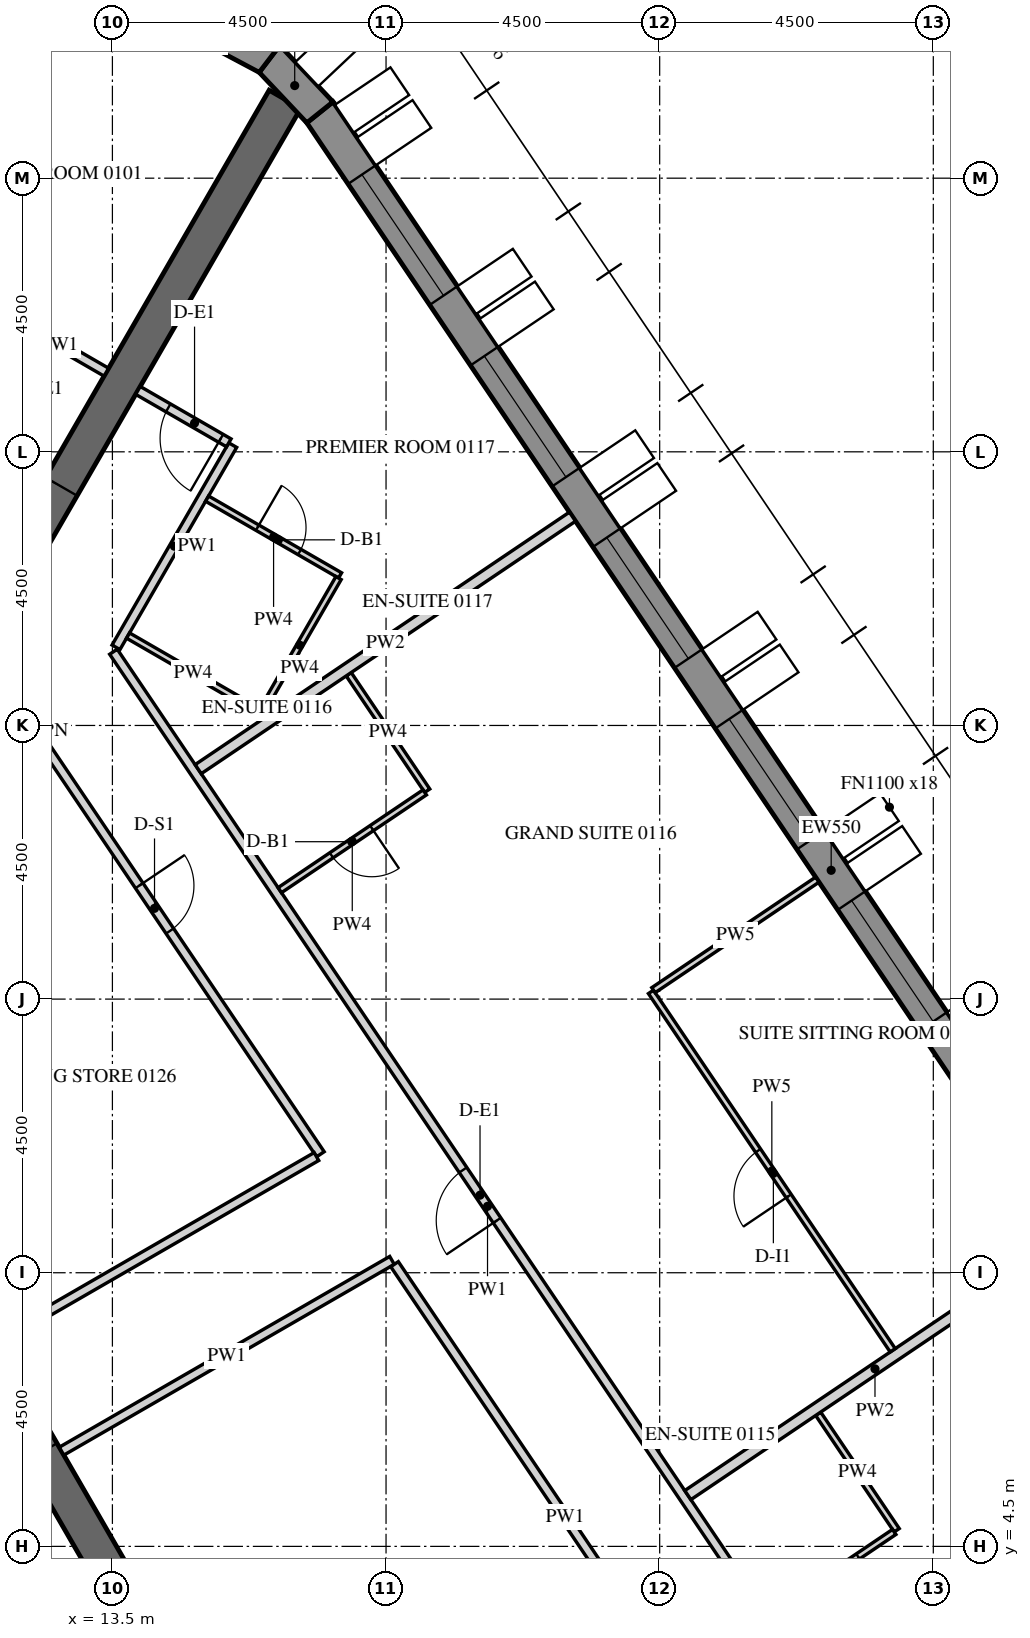
"""IFC4 building model, lengths in metres.
Left out: names, types, materials, properties, quantities, classifications, styles, units other than length and angle.
Written with IfcOpenShell. Run it as: python <this file> out.ifc"""

import sys

from ifc_helpers import new_model, si_unit, direction, frame, frame_2d, origin, place, context, subcontext, project, spatial, polyline, rectangle, outline, extrude, element, fill, save


model = new_model("IFC4")
c1 = context("Model", 3, precision=1e-05, world=origin(), true_north=direction((0.0, 1.0)))
c2 = subcontext(c1, "Body", "Model", "MODEL_VIEW")
j1 = project(units=[si_unit("LENGTHUNIT", "METRE"), si_unit("PLANEANGLEUNIT", "RADIAN")], contexts=[c1])
p1 = place(None, origin())
s1 = spatial("IfcSite", under=j1, at=p1, CompositionType="ELEMENT")
p2 = place(p1, origin())
s2 = spatial("IfcBuilding", under=s1, at=p2, CompositionType="ELEMENT")
p3 = place(p2, frame((0.0, 0.0, 37.5)))
s3 = spatial("IfcBuildingStorey", under=s2, at=p3, CompositionType="ELEMENT", Elevation=37.5)
p4 = place(p3, frame((33.728, 3.153, -0.15), z_axis=(0.0, 0.0, 1.0), x_axis=(-0.559192411416, 0.82903790445, 0.0)))
e1 = element("IfcWall", 1, at=p4, inside=s3, PredefinedType="SOLIDWALL", context=c2, shape_type="SweptSolid", body=[
    extrude(outline(polyline([(-0.026, -0.275), (30.093, -0.275), (30.048, 0.275), (0.026, 0.275), (-0.026, -0.275)])), origin(), (0.0, 0.0, 1.0), 3.9),
])
p5 = place(p4, frame((1.236, 0.0, 1.05)))
e2 = element("IfcOpeningElement", 2, at=p5, cuts=e1, PredefinedType="OPENING", context=c2, shape_type="SweptSolid", body=[
    extrude(rectangle(XDim=2.4, YDim=2.4, at=frame_2d((1.2, 1.2))), frame((0.0, 0.285, 0.0), z_axis=(0.0, -1.0, 0.0), x_axis=(1.0, 0.0, 0.0)), (0.0, 0.0, 1.0), 0.57),
])
p6 = place(p4, frame((4.835, 0.0, 1.05)))
e3 = element("IfcOpeningElement", 3, at=p6, cuts=e1, PredefinedType="OPENING", context=c2, shape_type="SweptSolid", body=[
    extrude(rectangle(XDim=2.4, YDim=2.4, at=frame_2d((1.2, 1.2))), frame((0.0, 0.285, 0.0), z_axis=(0.0, -1.0, 0.0), x_axis=(1.0, 0.0, 0.0)), (0.0, 0.0, 1.0), 0.57),
])
p7 = place(p4, frame((8.436, 0.0, 1.05)))
e4 = element("IfcOpeningElement", 4, at=p7, cuts=e1, PredefinedType="OPENING", context=c2, shape_type="SweptSolid", body=[
    extrude(rectangle(XDim=2.4, YDim=2.4, at=frame_2d((1.2, 1.2))), frame((0.0, 0.285, 0.0), z_axis=(0.0, -1.0, 0.0), x_axis=(1.0, 0.0, 0.0)), (0.0, 0.0, 1.0), 0.57),
])
p8 = place(p4, frame((12.035, 0.0, 1.05)))
e5 = element("IfcOpeningElement", 5, at=p8, cuts=e1, PredefinedType="OPENING", context=c2, shape_type="SweptSolid", body=[
    extrude(rectangle(XDim=2.4, YDim=2.4, at=frame_2d((1.2, 1.2))), frame((0.0, 0.285, 0.0), z_axis=(0.0, -1.0, 0.0), x_axis=(1.0, 0.0, 0.0)), (0.0, 0.0, 1.0), 0.57),
])
p9 = place(p4, frame((15.635, 0.0, 1.05)))
e6 = element("IfcOpeningElement", 6, at=p9, cuts=e1, PredefinedType="OPENING", context=c2, shape_type="SweptSolid", body=[
    extrude(rectangle(XDim=2.4, YDim=2.4, at=frame_2d((1.2, 1.2))), frame((0.0, 0.285, 0.0), z_axis=(0.0, -1.0, 0.0), x_axis=(1.0, 0.0, 0.0)), (0.0, 0.0, 1.0), 0.57),
])
p10 = place(p4, frame((19.236, 0.0, 1.05)))
e7 = element("IfcOpeningElement", 7, at=p10, cuts=e1, PredefinedType="OPENING", context=c2, shape_type="SweptSolid", body=[
    extrude(rectangle(XDim=2.4, YDim=2.4, at=frame_2d((1.2, 1.2))), frame((0.0, 0.285, 0.0), z_axis=(0.0, -1.0, 0.0), x_axis=(1.0, 0.0, 0.0)), (0.0, 0.0, 1.0), 0.57),
])
p11 = place(p4, frame((22.835, 0.0, 1.05)))
e8 = element("IfcOpeningElement", 8, at=p11, cuts=e1, PredefinedType="OPENING", context=c2, shape_type="SweptSolid", body=[
    extrude(rectangle(XDim=2.4, YDim=2.4, at=frame_2d((1.2, 1.2))), frame((0.0, 0.285, 0.0), z_axis=(0.0, -1.0, 0.0), x_axis=(1.0, 0.0, 0.0)), (0.0, 0.0, 1.0), 0.57),
])
p12 = place(p4, frame((26.436, 0.0, 1.05)))
e9 = element("IfcOpeningElement", 9, at=p12, cuts=e1, PredefinedType="OPENING", context=c2, shape_type="SweptSolid", body=[
    extrude(rectangle(XDim=2.4, YDim=2.4, at=frame_2d((1.2, 1.2))), frame((0.0, 0.285, 0.0), z_axis=(0.0, -1.0, 0.0), x_axis=(1.0, 0.0, 0.0)), (0.0, 0.0, 1.0), 0.57),
])
p13 = place(p3, frame((16.913, 28.083, -0.15), z_axis=(0.0, 0.0, 1.0), x_axis=(-0.686196220404, 0.727416488061, 0.0)))
e10 = element("IfcWall", 10, at=p13, inside=s3, PredefinedType="SOLIDWALL", context=c2, shape_type="SweptSolid", body=[
    extrude(outline(polyline([(-0.022, -0.275), (1.253, -0.275), (1.163, 0.275), (0.022, 0.275), (-0.022, -0.275)])), origin(), (0.0, 0.0, 1.0), 3.9),
])
p14 = place(p3, frame((16.083, 28.962, -0.15), z_axis=(0.0, 0.0, 1.0), x_axis=(-0.882995347911, 0.469381737574, 0.0)))
e11 = element("IfcWall", 11, at=p14, inside=s3, PredefinedType="SOLIDWALL", context=c2, shape_type="SweptSolid", body=[
    extrude(outline(polyline([(-0.045, -0.275), (1.253, -0.275), (1.163, 0.275), (0.045, 0.275), (-0.045, -0.275)])), origin(), (0.0, 0.0, 1.0), 3.9),
])
p15 = place(p3, frame((15.819, 0.0, -0.15), z_axis=(0.0, 0.0, 1.0), x_axis=(-0.499999880136, 0.866025472988, 0.0)))
e12 = element("IfcWall", 12, at=p15, inside=s3, PredefinedType="SHEAR", context=c2, shape_type="SweptSolid", body=[
    extrude(outline(polyline([(-0.173, -0.3), (15.993, -0.3), (15.646, 0.3), (0.173, 0.3), (-0.173, -0.3)])), origin(), (0.0, 0.0, 1.0), 3.9),
])
p16 = place(p15, frame((6.981, 0.0, 0.15)))
e13 = element("IfcOpeningElement", 13, at=p16, cuts=e12, PredefinedType="OPENING", context=c2, shape_type="SweptSolid", body=[
    extrude(rectangle(XDim=1.8, YDim=2.4, at=frame_2d((0.9, 1.2))), frame((0.0, 0.31, 0.0), z_axis=(0.0, -1.0, 0.0), x_axis=(1.0, 0.0, 0.0)), (0.0, 0.0, 1.0), 0.62),
])
p17 = place(p3, frame((8.083, 14.0, -0.15), z_axis=(0.0, 0.0, 1.0), x_axis=(0.499997680643, 0.866026742862, 0.0)))
e14 = element("IfcWall", 14, at=p17, inside=s3, PredefinedType="SHEAR", context=c2, shape_type="SweptSolid", body=[
    extrude(rectangle(XDim=16.509, YDim=0.6, at=frame_2d((8.254, 0.0))), origin(), (0.0, 0.0, 1.0), 3.9),
])
p18 = place(p17, frame((7.354, 0.0, 0.15)))
e15 = element("IfcOpeningElement", 15, at=p18, cuts=e14, PredefinedType="OPENING", context=c2, shape_type="SweptSolid", body=[
    extrude(rectangle(XDim=1.8, YDim=2.4, at=frame_2d((0.9, 1.2))), frame((0.0, 0.31, 0.0), z_axis=(0.0, -1.0, 0.0), x_axis=(1.0, 0.0, 0.0)), (0.0, 0.0, 1.0), 0.62),
])
p19 = place(p3, frame((13.4, 23.81, 0.0), z_axis=(0.0, 0.0, 1.0), x_axis=(-0.865989075817, 0.500062916607, 0.0)))
e16 = element("IfcWall", 16, at=p19, inside=s3, PredefinedType="PARTITIONING", context=c2, shape_type="SweptSolid", body=[
    extrude(rectangle(XDim=1.8, YDim=0.15, at=frame_2d((0.9, 0.0))), origin(), (0.0, 0.0, 1.0), 2.988),
])
p20 = place(p3, frame((25.821, 0.972, 0.0), z_axis=(0.0, 0.0, 1.0), x_axis=(-0.559193816298, 0.829036956845, 0.0)))
e17 = element("IfcWall", 17, at=p20, inside=s3, PredefinedType="PARTITIONING", context=c2, shape_type="SweptSolid", body=[
    extrude(rectangle(XDim=22.002, YDim=0.15, at=frame_2d((11.001, 0.0))), origin(), (0.0, 0.0, 1.0), 2.988),
])
p21 = place(p20, frame((0.869, 0.0, 0.0)))
e18 = element("IfcOpeningElement", 18, at=p21, cuts=e17, PredefinedType="OPENING", context=c2, shape_type="SweptSolid", body=[
    extrude(rectangle(XDim=1.0, YDim=2.1, at=frame_2d((0.5, 1.05))), frame((0.0, 0.085, 0.0), z_axis=(0.0, -1.0, 0.0), x_axis=(1.0, 0.0, 0.0)), (0.0, 0.0, 1.0), 0.17),
])
p22 = place(p20, frame((10.721, 0.0, 0.0)))
e19 = element("IfcOpeningElement", 19, at=p22, cuts=e17, PredefinedType="OPENING", context=c2, shape_type="SweptSolid", body=[
    extrude(rectangle(XDim=1.0, YDim=2.1, at=frame_2d((0.5, 1.05))), frame((0.0, 0.085, 0.0), z_axis=(0.0, -1.0, 0.0), x_axis=(1.0, 0.0, 0.0)), (0.0, 0.0, 1.0), 0.17),
])
p23 = place(p3, frame((13.559, 19.285, 0.0), z_axis=(0.0, 0.0, 1.0), x_axis=(0.499975646431, 0.866039463868, 0.0)))
e20 = element("IfcWall", 20, at=p23, inside=s3, PredefinedType="PARTITIONING", context=c2, shape_type="SweptSolid", body=[
    extrude(rectangle(XDim=3.84, YDim=0.15, at=frame_2d((1.92, 0.0))), origin(), (0.0, 0.0, 1.0), 2.988),
])
p24 = place(p3, frame((15.414, 22.648, 0.0), z_axis=(0.0, 0.0, 1.0), x_axis=(-0.866074815912, 0.499914405916, 0.0)))
e21 = element("IfcWall", 21, at=p24, inside=s3, PredefinedType="PARTITIONING", context=c2, shape_type="SweptSolid", body=[
    extrude(rectangle(XDim=1.725, YDim=0.15, at=frame_2d((0.862, 0.0))), origin(), (0.0, 0.0, 1.0), 2.988),
])
p25 = place(p24, frame((0.15, 0.0, 0.0)))
e22 = element("IfcOpeningElement", 22, at=p25, cuts=e21, PredefinedType="OPENING", context=c2, shape_type="SweptSolid", body=[
    extrude(rectangle(XDim=1.0, YDim=2.1, at=frame_2d((0.5, 1.05))), frame((0.0, 0.085, 0.0), z_axis=(0.0, -1.0, 0.0), x_axis=(1.0, 0.0, 0.0)), (0.0, 0.0, 1.0), 0.17),
])
p26 = place(p3, frame((12.664, 6.066, 0.0), z_axis=(0.0, 0.0, 1.0), x_axis=(0.866036561919, 0.499980673046, 0.0)))
e23 = element("IfcWall", 23, at=p26, inside=s3, PredefinedType="PARTITIONING", context=c2, shape_type="SweptSolid", body=[
    extrude(rectangle(XDim=6.275, YDim=0.15, at=frame_2d((3.137, 0.0))), origin(), (0.0, 0.0, 1.0), 2.988),
])
p27 = place(p3, frame((18.14, 9.141, 0.0), z_axis=(0.0, 0.0, 1.0), x_axis=(0.55918799196, -0.829040885389, 0.0)))
e24 = element("IfcWall", 24, at=p27, inside=s3, PredefinedType="PARTITIONING", context=c2, shape_type="SweptSolid", body=[
    extrude(rectangle(XDim=10.025, YDim=0.15, at=frame_2d((5.013, 0.0))), origin(), (0.0, 0.0, 1.0), 2.988),
])
p28 = place(p3, frame((11.465, 19.037, 0.0), z_axis=(0.0, 0.0, 1.0), x_axis=(0.559196064773, -0.829035440221, 0.0)))
e25 = element("IfcWall", 25, at=p28, inside=s3, PredefinedType="PARTITIONING", context=c2, shape_type="SweptSolid", body=[
    extrude(rectangle(XDim=9.757, YDim=0.15, at=frame_2d((4.878, 0.0))), origin(), (0.0, 0.0, 1.0), 2.988),
])
p29 = place(p28, frame((4.428, 0.0, 0.0)))
e26 = element("IfcOpeningElement", 26, at=p29, cuts=e25, PredefinedType="OPENING", context=c2, shape_type="SweptSolid", body=[
    extrude(rectangle(XDim=0.9, YDim=2.1, at=frame_2d((0.45, 1.05))), frame((0.0, 0.085, 0.0), z_axis=(0.0, -1.0, 0.0), x_axis=(1.0, 0.0, 0.0)), (0.0, 0.0, 1.0), 0.17),
])
p30 = place(p3, frame((16.855, 10.911, 0.0), z_axis=(0.0, 0.0, 1.0), x_axis=(-0.866020343444, -0.500008764664, 0.0)))
e27 = element("IfcWall", 27, at=p30, inside=s3, PredefinedType="PARTITIONING", context=c2, shape_type="SweptSolid", body=[
    extrude(rectangle(XDim=6.053, YDim=0.15, at=frame_2d((3.026, 0.0))), origin(), (0.0, 0.0, 1.0), 2.988),
])
p31 = place(p3, frame((25.107, 6.68, 0.0), z_axis=(0.0, 0.0, 1.0), x_axis=(0.559204176839, -0.829029968461, 0.0)))
e28 = element("IfcWall", 28, at=p31, inside=s3, PredefinedType="PARTITIONING", context=c2, shape_type="SweptSolid", body=[
    extrude(rectangle(XDim=2.31, YDim=0.1, at=frame_2d((1.155, 0.0))), origin(), (0.0, 0.0, 1.0), 2.988),
])
p32 = place(p3, frame((26.357, 4.737, 0.0), z_axis=(0.0, 0.0, 1.0), x_axis=(-0.829094460354, -0.559108554585, 0.0)))
e29 = element("IfcWall", 29, at=p32, inside=s3, PredefinedType="PARTITIONING", context=c2, shape_type="SweptSolid", body=[
    extrude(rectangle(XDim=2.475, YDim=0.1, at=frame_2d((1.238, 0.0))), origin(), (0.0, 0.0, 1.0), 2.988),
])
p33 = place(p32, frame((0.72, 0.0, 0.0)))
e30 = element("IfcOpeningElement", 30, at=p33, cuts=e29, PredefinedType="OPENING", context=c2, shape_type="SweptSolid", body=[
    extrude(rectangle(XDim=0.8, YDim=2.1, at=frame_2d((0.4, 1.05))), frame((0.0, 0.06, 0.0), z_axis=(0.0, -1.0, 0.0), x_axis=(1.0, 0.0, 0.0)), (0.0, 0.0, 1.0), 0.12),
])
p34 = place(p3, frame((29.119, 9.495, 0.0), z_axis=(0.0, 0.0, 1.0), x_axis=(-0.829038452737, -0.559191598545, 0.0)))
e31 = element("IfcWall", 31, at=p34, inside=s3, PredefinedType="PARTITIONING", context=c2, shape_type="SweptSolid", body=[
    extrude(rectangle(XDim=7.425, YDim=0.18, at=frame_2d((3.713, 0.0))), origin(), (0.0, 0.0, 1.0), 2.988),
])
p35 = place(p3, frame((17.386, 18.842, 0.0), z_axis=(0.0, 0.0, 1.0), x_axis=(0.559131530856, -0.829078965602, 0.0)))
e32 = element("IfcWall", 32, at=p35, inside=s3, PredefinedType="PARTITIONING", context=c2, shape_type="SweptSolid", body=[
    extrude(rectangle(XDim=2.31, YDim=0.1, at=frame_2d((1.155, 0.0))), origin(), (0.0, 0.0, 1.0), 2.988),
])
p36 = place(p3, frame((18.636, 16.899, 0.0), z_axis=(0.0, 0.0, 1.0), x_axis=(-0.82904649496, -0.559179675234, 0.0)))
e33 = element("IfcWall", 33, at=p36, inside=s3, PredefinedType="PARTITIONING", context=c2, shape_type="SweptSolid", body=[
    extrude(rectangle(XDim=2.875, YDim=0.1, at=frame_2d((1.438, 0.0))), origin(), (0.0, 0.0, 1.0), 2.988),
])
p37 = place(p36, frame((1.05, 0.0, 0.0)))
e34 = element("IfcOpeningElement", 34, at=p37, cuts=e33, PredefinedType="OPENING", context=c2, shape_type="SweptSolid", body=[
    extrude(rectangle(XDim=0.8, YDim=2.1, at=frame_2d((0.4, 1.05))), frame((0.0, 0.06, 0.0), z_axis=(0.0, -1.0, 0.0), x_axis=(1.0, 0.0, 0.0)), (0.0, 0.0, 1.0), 0.12),
])
p38 = place(p3, frame((26.333, 7.724, 0.0), z_axis=(0.0, 0.0, 1.0), x_axis=(-0.559185029686, 0.829042883435, 0.0)))
e35 = element("IfcWall", 35, at=p38, inside=s3, PredefinedType="PARTITIONING", context=c2, shape_type="SweptSolid", body=[
    extrude(rectangle(XDim=7.11, YDim=0.1, at=frame_2d((3.555, 0.0))), origin(), (0.0, 0.0, 1.0), 2.988),
])
p39 = place(p38, frame((3.06, 0.0, 0.0)))
e36 = element("IfcOpeningElement", 36, at=p39, cuts=e35, PredefinedType="OPENING", context=c2, shape_type="SweptSolid", body=[
    extrude(rectangle(XDim=0.9, YDim=2.1, at=frame_2d((0.45, 1.05))), frame((0.0, 0.06, 0.0), z_axis=(0.0, -1.0, 0.0), x_axis=(1.0, 0.0, 0.0)), (0.0, 0.0, 1.0), 0.12),
])
p40 = place(p3, frame((22.398, 13.647, 0.0), z_axis=(0.0, 0.0, 1.0), x_axis=(0.829033253898, 0.55919930609, 0.0)))
e37 = element("IfcWall", 37, at=p40, inside=s3, PredefinedType="PARTITIONING", context=c2, shape_type="SweptSolid", body=[
    extrude(rectangle(XDim=3.25, YDim=0.1, at=frame_2d((1.625, 0.0))), origin(), (0.0, 0.0, 1.0), 2.988),
])
p41 = place(p3, frame((21.066, 21.433, 0.0), z_axis=(0.0, 0.0, 1.0), x_axis=(-0.829028170871, -0.559206841788, 0.0)))
e38 = element("IfcWall", 38, at=p41, inside=s3, PredefinedType="PARTITIONING", context=c2, shape_type="SweptSolid", body=[
    extrude(rectangle(XDim=7.425, YDim=0.18, at=frame_2d((3.712, 0.0))), origin(), (0.0, 0.0, 1.0), 2.988),
])
p42 = place(p3, frame((15.057, 21.73, 0.0), z_axis=(0.0, 0.0, 1.0), x_axis=(0.866014894461, -0.50001820224, 0.0)))
e39 = element("IfcWall", 39, at=p42, inside=s3, PredefinedType="PARTITIONING", context=c2, shape_type="SweptSolid", body=[
    extrude(rectangle(XDim=2.525, YDim=0.1, at=frame_2d((1.262, 0.0))), origin(), (0.0, 0.0, 1.0), 2.988),
])
p43 = place(p42, frame((0.955, 0.0, 0.0)))
e40 = element("IfcOpeningElement", 40, at=p43, cuts=e39, PredefinedType="OPENING", context=c2, shape_type="SweptSolid", body=[
    extrude(rectangle(XDim=0.8, YDim=2.1, at=frame_2d((0.4, 1.05))), frame((0.0, 0.06, 0.0), z_axis=(0.0, -1.0, 0.0), x_axis=(1.0, 0.0, 0.0)), (0.0, 0.0, 1.0), 0.12),
])
p44 = place(p3, frame((17.219, 20.424, 0.0), z_axis=(0.0, 0.0, 1.0), x_axis=(-0.499948979701, -0.866054858364, 0.0)))
e41 = element("IfcWall", 41, at=p44, inside=s3, PredefinedType="PARTITIONING", context=c2, shape_type="SweptSolid", body=[
    extrude(rectangle(XDim=2.55, YDim=0.1, at=frame_2d((1.275, 0.0))), origin(), (0.0, 0.0, 1.0), 2.988),
])
p45 = place(p3, frame((15.901, 18.241, 0.0), z_axis=(0.0, 0.0, 1.0), x_axis=(-0.866006523861, 0.500032699561, 0.0)))
e42 = element("IfcWall", 42, at=p45, inside=s3, PredefinedType="PARTITIONING", context=c2, shape_type="SweptSolid", body=[
    extrude(rectangle(XDim=2.475, YDim=0.1, at=frame_2d((1.237, 0.0))), origin(), (0.0, 0.0, 1.0), 2.988),
])
p46 = place(p8, frame((0.0, 0.205, 0.0)))
e43 = element("IfcWindow", 43, at=p46, inside=s3, PartitioningType="DOUBLE_PANEL_VERTICAL", PredefinedType="WINDOW", context=c2, shape_type="SweptSolid", body=[
    extrude(rectangle(XDim=2.4, YDim=2.4, at=frame_2d((1.2, 1.2))), frame((0.0, 0.03, 0.0), z_axis=(0.0, -1.0, 0.0), x_axis=(1.0, 0.0, 0.0)), (0.0, 0.0, 1.0), 0.06),
])
fill(e5, e43)
p47 = place(p9, frame((0.0, 0.205, 0.0)))
e44 = element("IfcWindow", 44, at=p47, inside=s3, PartitioningType="DOUBLE_PANEL_VERTICAL", PredefinedType="WINDOW", context=c2, shape_type="SweptSolid", body=[
    extrude(rectangle(XDim=2.4, YDim=2.4, at=frame_2d((1.2, 1.2))), frame((0.0, 0.03, 0.0), z_axis=(0.0, -1.0, 0.0), x_axis=(1.0, 0.0, 0.0)), (0.0, 0.0, 1.0), 0.06),
])
fill(e6, e44)
p48 = place(p10, frame((0.0, 0.205, 0.0)))
e45 = element("IfcWindow", 45, at=p48, inside=s3, PartitioningType="DOUBLE_PANEL_VERTICAL", PredefinedType="WINDOW", context=c2, shape_type="SweptSolid", body=[
    extrude(rectangle(XDim=2.4, YDim=2.4, at=frame_2d((1.2, 1.2))), frame((0.0, 0.03, 0.0), z_axis=(0.0, -1.0, 0.0), x_axis=(1.0, 0.0, 0.0)), (0.0, 0.0, 1.0), 0.06),
])
fill(e7, e45)
p49 = place(p11, frame((0.0, 0.205, 0.0)))
e46 = element("IfcWindow", 46, at=p49, inside=s3, PartitioningType="DOUBLE_PANEL_VERTICAL", PredefinedType="WINDOW", context=c2, shape_type="SweptSolid", body=[
    extrude(rectangle(XDim=2.4, YDim=2.4, at=frame_2d((1.2, 1.2))), frame((0.0, 0.03, 0.0), z_axis=(0.0, -1.0, 0.0), x_axis=(1.0, 0.0, 0.0)), (0.0, 0.0, 1.0), 0.06),
])
fill(e8, e46)
p50 = place(p12, frame((0.0, 0.205, 0.0)))
e47 = element("IfcWindow", 47, at=p50, inside=s3, PartitioningType="DOUBLE_PANEL_VERTICAL", PredefinedType="WINDOW", context=c2, shape_type="SweptSolid", body=[
    extrude(rectangle(XDim=2.4, YDim=2.4, at=frame_2d((1.2, 1.2))), frame((0.0, 0.03, 0.0), z_axis=(0.0, -1.0, 0.0), x_axis=(1.0, 0.0, 0.0)), (0.0, 0.0, 1.0), 0.06),
])
fill(e9, e47)
p51 = place(p18, origin())
e48 = element("IfcDoor", 48, at=p51, inside=s3, OperationType="DOUBLE_DOOR_SINGLE_SWING", PredefinedType="DOOR", context=c2, shape_type="SweptSolid", body=[
    extrude(rectangle(XDim=1.8, YDim=2.4, at=frame_2d((0.9, 1.2))), frame((0.0, 0.025, 0.0), z_axis=(0.0, -1.0, 0.0), x_axis=(1.0, 0.0, 0.0)), (0.0, 0.0, 1.0), 0.05),
])
fill(e15, e48)
p52 = place(p33, origin())
e49 = element("IfcDoor", 49, at=p52, inside=s3, OperationType="SINGLE_SWING_RIGHT", PredefinedType="DOOR", context=c2, shape_type="SweptSolid", body=[
    extrude(rectangle(XDim=0.8, YDim=2.1, at=frame_2d((0.4, 1.05))), frame((0.0, 0.025, 0.0), z_axis=(0.0, -1.0, 0.0), x_axis=(1.0, 0.0, 0.0)), (0.0, 0.0, 1.0), 0.05),
])
fill(e30, e49)
p53 = place(p22, origin())
e50 = element("IfcDoor", 50, at=p53, inside=s3, OperationType="SINGLE_SWING_RIGHT", PredefinedType="DOOR", context=c2, shape_type="SweptSolid", body=[
    extrude(rectangle(XDim=1.0, YDim=2.1, at=frame_2d((0.5, 1.05))), frame((0.0, 0.025, 0.0), z_axis=(0.0, -1.0, 0.0), x_axis=(1.0, 0.0, 0.0)), (0.0, 0.0, 1.0), 0.05),
])
fill(e19, e50)
p54 = place(p37, origin())
e51 = element("IfcDoor", 51, at=p54, inside=s3, OperationType="SINGLE_SWING_LEFT", PredefinedType="DOOR", context=c2, shape_type="SweptSolid", body=[
    extrude(rectangle(XDim=0.8, YDim=2.1, at=frame_2d((0.4, 1.05))), frame((0.0, 0.025, 0.0), z_axis=(0.0, -1.0, 0.0), x_axis=(1.0, 0.0, 0.0)), (0.0, 0.0, 1.0), 0.05),
])
fill(e34, e51)
p55 = place(p39, origin())
e52 = element("IfcDoor", 52, at=p55, inside=s3, OperationType="SINGLE_SWING_RIGHT", PredefinedType="DOOR", context=c2, shape_type="SweptSolid", body=[
    extrude(rectangle(XDim=0.9, YDim=2.1, at=frame_2d((0.45, 1.05))), frame((0.0, 0.025, 0.0), z_axis=(0.0, -1.0, 0.0), x_axis=(1.0, 0.0, 0.0)), (0.0, 0.0, 1.0), 0.05),
])
fill(e36, e52)
p56 = place(p25, origin())
e53 = element("IfcDoor", 53, at=p56, inside=s3, OperationType="SINGLE_SWING_RIGHT", PredefinedType="DOOR", context=c2, shape_type="SweptSolid", body=[
    extrude(rectangle(XDim=1.0, YDim=2.1, at=frame_2d((0.5, 1.05))), frame((0.0, 0.025, 0.0), z_axis=(0.0, -1.0, 0.0), x_axis=(1.0, 0.0, 0.0)), (0.0, 0.0, 1.0), 0.05),
])
fill(e22, e53)
p57 = place(p43, origin())
e54 = element("IfcDoor", 54, at=p57, inside=s3, OperationType="SINGLE_SWING_LEFT", PredefinedType="DOOR", context=c2, shape_type="SweptSolid", body=[
    extrude(rectangle(XDim=0.8, YDim=2.1, at=frame_2d((0.4, 1.05))), frame((0.0, 0.025, 0.0), z_axis=(0.0, -1.0, 0.0), x_axis=(1.0, 0.0, 0.0)), (0.0, 0.0, 1.0), 0.05),
])
fill(e40, e54)
p58 = place(p29, origin())
e55 = element("IfcDoor", 55, at=p58, inside=s3, OperationType="SINGLE_SWING_RIGHT", PredefinedType="DOOR", context=c2, shape_type="SweptSolid", body=[
    extrude(rectangle(XDim=0.9, YDim=2.1, at=frame_2d((0.45, 1.05))), frame((0.0, 0.025, 0.0), z_axis=(0.0, -1.0, 0.0), x_axis=(1.0, 0.0, 0.0)), (0.0, 0.0, 1.0), 0.05),
])
fill(e26, e55)
save(model, sys.argv[1])
